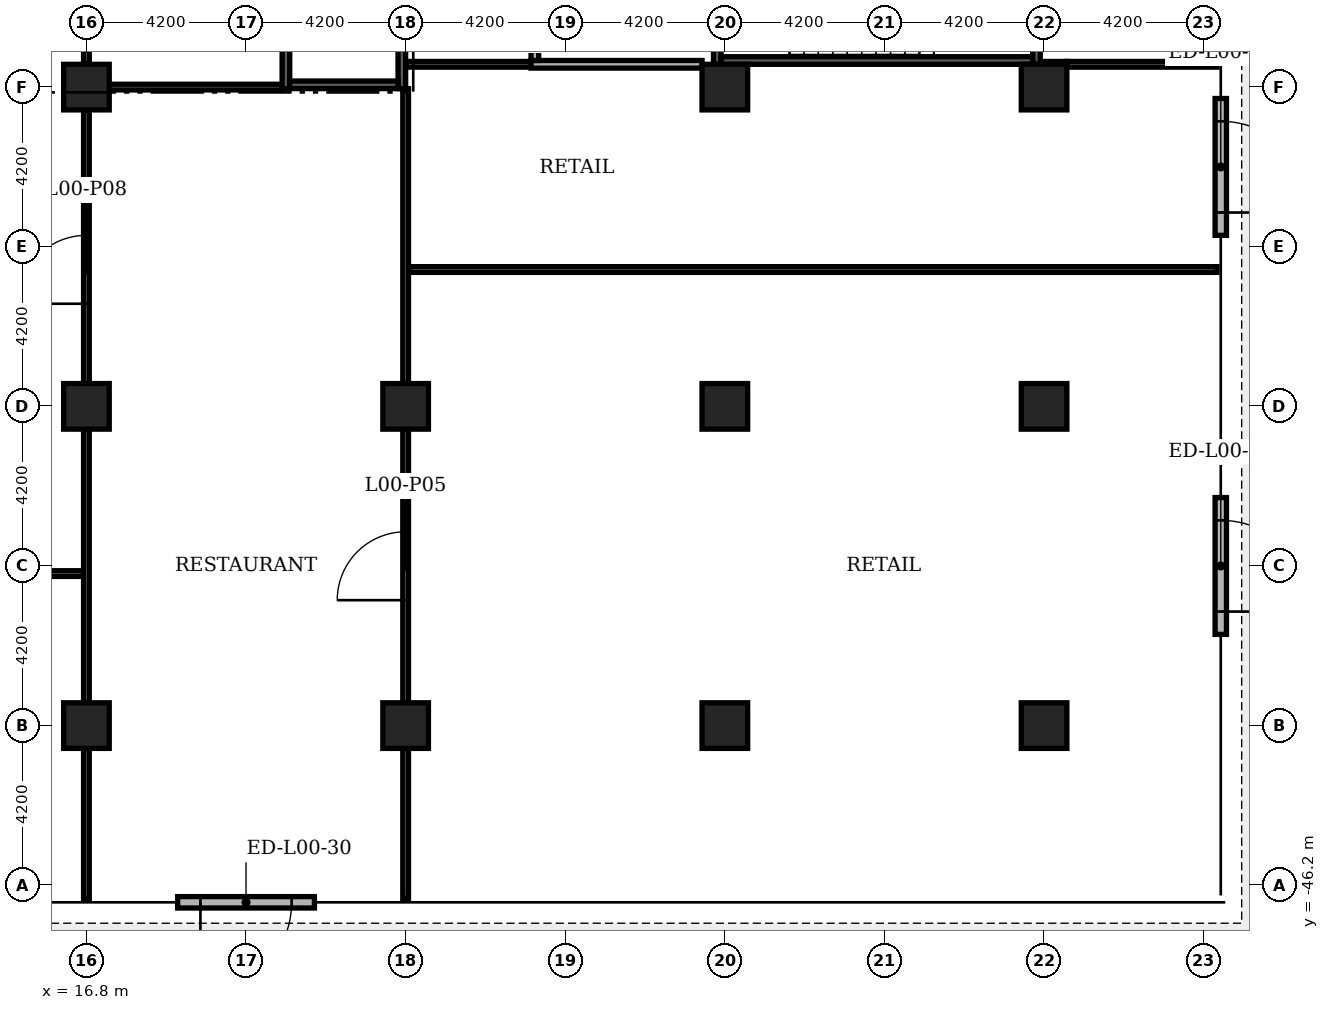
"""IFC4 building model, lengths in metres.
Left out: names, types, materials, properties, quantities, classifications, styles, units other than length and angle.
Written with IfcOpenShell. Run it as: python <this file> out.ifc"""

import sys

from ifc_helpers import new_model, si_unit, direction, frame, frame_2d, origin, origin_2d, place, context, subcontext, project, spatial, rectangle, extrude, element, fill, save


model = new_model("IFC4")
c1 = context("Model", 3, precision=1e-05, world=origin(), true_north=direction((0.0, 1.0)))
c2 = subcontext(c1, "Body", "Model", "MODEL_VIEW")
j1 = project(units=[si_unit("LENGTHUNIT", "METRE"), si_unit("PLANEANGLEUNIT", "RADIAN")], contexts=[c1])
p1 = place(None, origin())
s1 = spatial("IfcSite", under=j1, at=p1, CompositionType="ELEMENT")
p2 = place(p1, origin())
s2 = spatial("IfcBuilding", under=s1, at=p2, CompositionType="ELEMENT")
p3 = place(p2, origin())
s3 = spatial("IfcBuildingStorey", under=s2, at=p3, CompositionType="ELEMENT", Elevation=0.0)
for number, where, z_axis, x_axis in (
    (1, (16.8, -25.2, 0.0), (0.0, 0.0, 1.0), (1.0, 0.0, 0.0)),
    (2, (16.8, -33.6, 0.0), (0.0, 0.0, 1.0), (1.0, 0.0, 0.0)),
    (3, (16.8, -42.0, 0.0), (0.0, 0.0, 1.0), (1.0, 0.0, 0.0)),
    (4, (25.2, -33.6, 0.0), (0.0, 0.0, 1.0), (1.0, 0.0, 0.0)),
    (5, (25.2, -42.0, 0.0), (0.0, 0.0, 1.0), (1.0, 0.0, 0.0)),
    (6, (33.6, -25.2, 0.0), (0.0, 0.0, 1.0), (1.0, 0.0, 0.0)),
    (7, (33.6, -33.6, 0.0), (0.0, 0.0, 1.0), (1.0, 0.0, 0.0)),
    (8, (33.6, -42.0, 0.0), (0.0, 0.0, 1.0), (1.0, 0.0, 0.0)),
    (9, (42.0, -25.2, 0.0), (0.0, 0.0, 1.0), (1.0, 0.0, 0.0)),
    (10, (42.0, -33.6, 0.0), (0.0, 0.0, 1.0), (1.0, 0.0, 0.0)),
    (11, (42.0, -42.0, 0.0), (0.0, 0.0, 1.0), (1.0, 0.0, 0.0)),
):
    element("IfcColumn", number, at=place(p3, frame(where, z_axis=z_axis, x_axis=x_axis)), inside=s3, PredefinedType="COLUMN", context=c2, shape_type="SweptSolid", body=[
        extrude(rectangle(XDim=1.2, YDim=1.2, at=origin_2d()), origin(), (0.0, 0.0, 1.0), 7.2),
    ])
p4 = place(p3, frame((46.65, -39.6, 0.0), z_axis=(0.0, 0.0, 1.0), x_axis=(0.0, 1.0, 0.0)))
e12 = element("IfcWall", 12, at=p4, inside=s3, PredefinedType="STANDARD", context=c2, shape_type="SweptSolid", body=[
    extrude(rectangle(XDim=3.6, YDim=0.3, at=frame_2d((1.8, 0.0))), origin(), (0.0, 0.0, 1.0), 6.78),
])
p5 = place(p4, frame((0.6, 0.0, 0.0)))
e13 = element("IfcOpeningElement", 13, at=p5, cuts=e12, PredefinedType="OPENING", context=c2, shape_type="SweptSolid", body=[
    extrude(rectangle(XDim=2.4, YDim=2.4, at=frame_2d((1.2, 1.2))), frame((0.0, 0.16, 0.0), z_axis=(0.0, -1.0, 0.0), x_axis=(1.0, 0.0, 0.0)), (0.0, 0.0, 1.0), 0.32),
])
p6 = place(p3, frame((46.65, -29.1, 0.0), z_axis=(0.0, 0.0, 1.0), x_axis=(0.0, 1.0, 0.0)))
e14 = element("IfcWall", 14, at=p6, inside=s3, PredefinedType="STANDARD", context=c2, shape_type="SweptSolid", body=[
    extrude(rectangle(XDim=3.6, YDim=0.3, at=frame_2d((1.8, 0.0))), origin(), (0.0, 0.0, 1.0), 6.78),
])
p7 = place(p6, frame((0.6, 0.0, 0.0)))
e15 = element("IfcOpeningElement", 15, at=p7, cuts=e14, PredefinedType="OPENING", context=c2, shape_type="SweptSolid", body=[
    extrude(rectangle(XDim=2.4, YDim=2.4, at=frame_2d((1.2, 1.2))), frame((0.0, 0.16, 0.0), z_axis=(0.0, -1.0, 0.0), x_axis=(1.0, 0.0, 0.0)), (0.0, 0.0, 1.0), 0.32),
])
p8 = place(p3, frame((19.2, -46.65, 0.0), z_axis=(0.0, 0.0, 1.0), x_axis=(1.0, 0.0, 0.0)))
e16 = element("IfcWall", 16, at=p8, inside=s3, PredefinedType="STANDARD", context=c2, shape_type="SweptSolid", body=[
    extrude(rectangle(XDim=3.6, YDim=0.3, at=frame_2d((1.8, 0.0))), origin(), (0.0, 0.0, 1.0), 6.78),
])
p9 = place(p8, frame((0.6, 0.0, 0.0)))
e17 = element("IfcOpeningElement", 17, at=p9, cuts=e16, PredefinedType="OPENING", context=c2, shape_type="SweptSolid", body=[
    extrude(rectangle(XDim=2.4, YDim=2.4, at=frame_2d((1.2, 1.2))), frame((0.0, 0.16, 0.0), z_axis=(0.0, -1.0, 0.0), x_axis=(1.0, 0.0, 0.0)), (0.0, 0.0, 1.0), 0.32),
])
p10 = place(p3, frame((-16.9, -38.0, 0.0), z_axis=(0.0, 0.0, 1.0), x_axis=(1.0, 0.0, 0.0)))
e18 = element("IfcWall", 18, at=p10, inside=s3, PredefinedType="PARTITIONING", context=c2, shape_type="SweptSolid", body=[
    extrude(rectangle(XDim=33.625, YDim=0.15, at=frame_2d((16.812, 0.0))), origin(), (0.0, 0.0, 1.0), 6.38),
])
p11 = place(p10, frame((7.7, 0.0, 0.0)))
e19 = element("IfcOpeningElement", 19, at=p11, cuts=e18, PredefinedType="OPENING", context=c2, shape_type="SweptSolid", body=[
    extrude(rectangle(XDim=2.4, YDim=2.4, at=frame_2d((1.2, 1.2))), frame((0.0, 0.085, 0.0), z_axis=(0.0, -1.0, 0.0), x_axis=(1.0, 0.0, 0.0)), (0.0, 0.0, 1.0), 0.17),
])
p12 = place(p10, frame((15.7, 0.0, 0.0)))
e20 = element("IfcOpeningElement", 20, at=p12, cuts=e18, PredefinedType="OPENING", context=c2, shape_type="SweptSolid", body=[
    extrude(rectangle(XDim=2.4, YDim=2.4, at=frame_2d((1.2, 1.2))), frame((0.0, 0.085, 0.0), z_axis=(0.0, -1.0, 0.0), x_axis=(1.0, 0.0, 0.0)), (0.0, 0.0, 1.0), 0.17),
])
p13 = place(p10, frame((23.7, 0.0, 0.0)))
e21 = element("IfcOpeningElement", 21, at=p13, cuts=e18, PredefinedType="OPENING", context=c2, shape_type="SweptSolid", body=[
    extrude(rectangle(XDim=2.4, YDim=2.4, at=frame_2d((1.2, 1.2))), frame((0.0, 0.085, 0.0), z_axis=(0.0, -1.0, 0.0), x_axis=(1.0, 0.0, 0.0)), (0.0, 0.0, 1.0), 0.17),
])
p14 = place(p3, frame((25.275, -30.0, 0.0), z_axis=(0.0, 0.0, 1.0), x_axis=(1.0, 0.0, 0.0)))
e22 = element("IfcWall", 22, at=p14, inside=s3, PredefinedType="PARTITIONING", context=c2, shape_type="SweptSolid", body=[
    extrude(rectangle(XDim=21.275, YDim=0.15, at=frame_2d((10.638, 0.0))), origin(), (0.0, 0.0, 1.0), 6.38),
])
p15 = place(p3, frame((17.4, -25.2, 0.0), z_axis=(0.0, 0.0, 1.0), x_axis=(1.0, 0.0, 0.0)))
e23 = element("IfcWall", 23, at=p15, inside=s3, PredefinedType="PARTITIONING", context=c2, shape_type="SweptSolid", body=[
    extrude(rectangle(XDim=4.55, YDim=0.15, at=frame_2d((2.275, 0.0))), origin(), (0.0, 0.0, 1.0), 6.48),
])
p16 = place(p3, frame((25.2, -24.6, 0.0), z_axis=(0.0, 0.0, 1.0), x_axis=(1.0, 0.0, 0.0)))
e24 = element("IfcWall", 24, at=p16, inside=s3, PredefinedType="PARTITIONING", context=c2, shape_type="SweptSolid", body=[
    extrude(rectangle(XDim=3.5, YDim=0.15, at=frame_2d((1.75, 0.0))), origin(), (0.0, 0.0, 1.0), 6.78),
])
p17 = place(p3, frame((28.5, -24.6, 0.0), z_axis=(0.0, 0.0, 1.0), x_axis=(1.0, 0.0, 0.0)))
e25 = element("IfcWall", 25, at=p17, inside=s3, PredefinedType="PARTITIONING", context=c2, shape_type="SweptSolid", body=[
    extrude(rectangle(XDim=4.5, YDim=0.2, at=frame_2d((2.25, 0.0))), origin(), (0.0, 0.0, 1.0), 6.78),
])
p18 = place(p3, frame((41.9, -24.6, 0.0), z_axis=(0.0, 0.0, 1.0), x_axis=(1.0, 0.0, 0.0)))
e26 = element("IfcWall", 26, at=p18, inside=s3, PredefinedType="PARTITIONING", context=c2, shape_type="SweptSolid", body=[
    extrude(rectangle(XDim=0.7, YDim=0.15, at=frame_2d((0.35, 0.0))), origin(), (0.0, 0.0, 1.0), 6.78),
])
p19 = place(p3, frame((42.6, -24.6, 0.0), z_axis=(0.0, 0.0, 1.0), x_axis=(1.0, 0.0, 0.0)))
e27 = element("IfcWall", 27, at=p19, inside=s3, PredefinedType="PARTITIONING", context=c2, shape_type="SweptSolid", body=[
    extrude(rectangle(XDim=3.95, YDim=0.15, at=frame_2d((1.975, 0.0))), origin(), (0.0, 0.0, 1.0), 6.78),
])
p20 = place(p3, frame((16.8, -46.55, 0.0), z_axis=(0.0, 0.0, 1.0), x_axis=(0.0, 1.0, 0.0)))
e28 = element("IfcWall", 28, at=p20, inside=s3, PredefinedType="PARTITIONING", context=c2, shape_type="SweptSolid", body=[
    extrude(rectangle(XDim=3.95, YDim=0.15, at=frame_2d((1.975, 0.0))), origin(), (0.0, 0.0, 1.0), 6.38),
])
p21 = place(p3, frame((16.8, -41.4, 0.0), z_axis=(0.0, 0.0, 1.0), x_axis=(0.0, 1.0, 0.0)))
e29 = element("IfcWall", 29, at=p21, inside=s3, PredefinedType="PARTITIONING", context=c2, shape_type="SweptSolid", body=[
    extrude(rectangle(XDim=7.2, YDim=0.15, at=frame_2d((3.6, 0.0))), origin(), (0.0, 0.0, 1.0), 6.38),
])
p22 = place(p3, frame((16.8, -33.0, 0.0), z_axis=(0.0, 0.0, 1.0), x_axis=(0.0, 1.0, 0.0)))
e30 = element("IfcWall", 30, at=p22, inside=s3, PredefinedType="PARTITIONING", context=c2, shape_type="SweptSolid", body=[
    extrude(rectangle(XDim=7.2, YDim=0.15, at=frame_2d((3.6, 0.0))), origin(), (0.0, 0.0, 1.0), 6.38),
])
p23 = place(p22, frame((2.1, 0.0, 0.0)))
e31 = element("IfcOpeningElement", 31, at=p23, cuts=e30, PredefinedType="OPENING", context=c2, shape_type="SweptSolid", body=[
    extrude(rectangle(XDim=1.8, YDim=2.2, at=frame_2d((0.9, 1.1))), frame((0.0, 0.085, 0.0), z_axis=(0.0, -1.0, 0.0), x_axis=(1.0, 0.0, 0.0)), (0.0, 0.0, 1.0), 0.17),
])
p24 = place(p3, frame((16.8, -24.6, 0.0), z_axis=(0.0, 0.0, 1.0), x_axis=(0.0, 1.0, 0.0)))
e32 = element("IfcWall", 32, at=p24, inside=s3, PredefinedType="PARTITIONING", context=c2, shape_type="SweptSolid", body=[
    extrude(rectangle(XDim=7.5, YDim=0.15, at=frame_2d((3.75, 0.0))), origin(), (0.0, 0.0, 1.0), 6.78),
])
p25 = place(p3, frame((25.2, -46.55, 0.0), z_axis=(0.0, 0.0, 1.0), x_axis=(0.0, 1.0, 0.0)))
e33 = element("IfcWall", 33, at=p25, inside=s3, PredefinedType="PARTITIONING", context=c2, shape_type="SweptSolid", body=[
    extrude(rectangle(XDim=3.95, YDim=0.15, at=frame_2d((1.975, 0.0))), origin(), (0.0, 0.0, 1.0), 6.38),
])
p26 = place(p3, frame((25.2, -41.4, 0.0), z_axis=(0.0, 0.0, 1.0), x_axis=(0.0, 1.0, 0.0)))
e34 = element("IfcWall", 34, at=p26, inside=s3, PredefinedType="PARTITIONING", context=c2, shape_type="SweptSolid", body=[
    extrude(rectangle(XDim=7.2, YDim=0.15, at=frame_2d((3.6, 0.0))), origin(), (0.0, 0.0, 1.0), 6.38),
])
p27 = place(p26, frame((2.7, 0.0, 0.0)))
e35 = element("IfcOpeningElement", 35, at=p27, cuts=e34, PredefinedType="OPENING", context=c2, shape_type="SweptSolid", body=[
    extrude(rectangle(XDim=1.8, YDim=2.2, at=frame_2d((0.9, 1.1))), frame((0.0, 0.085, 0.0), z_axis=(0.0, -1.0, 0.0), x_axis=(1.0, 0.0, 0.0)), (0.0, 0.0, 1.0), 0.17),
])
p28 = place(p3, frame((25.2, -33.0, 0.0), z_axis=(0.0, 0.0, 1.0), x_axis=(0.0, 1.0, 0.0)))
e36 = element("IfcWall", 36, at=p28, inside=s3, PredefinedType="PARTITIONING", context=c2, shape_type="SweptSolid", body=[
    extrude(rectangle(XDim=7.76, YDim=0.15, at=frame_2d((3.88, 0.0))), origin(), (0.0, 0.0, 1.0), 6.38),
])
p29 = place(p3, frame((28.6, -24.5, 0.0), z_axis=(0.0, 0.0, 1.0), x_axis=(0.0, 1.0, 0.0)))
e37 = element("IfcWall", 37, at=p29, inside=s3, PredefinedType="PARTITIONING", context=c2, shape_type="SweptSolid", body=[
    extrude(rectangle(XDim=3.95, YDim=0.2, at=frame_2d((1.975, 0.0))), origin(), (0.0, 0.0, 1.0), 6.78),
])
p30 = place(p3, frame((22.05, -25.24, 0.0), z_axis=(0.0, 0.0, 1.0), x_axis=(0.0, 1.0, 0.0)))
e38 = element("IfcWall", 38, at=p30, inside=s3, PredefinedType="SOLIDWALL", context=c2, shape_type="SweptSolid", body=[
    extrude(rectangle(XDim=6.74, YDim=0.2, at=frame_2d((3.37, 0.0))), origin(), (0.0, 0.0, 1.0), 6.78),
])
p31 = place(p3, frame((25.1, -25.24, 0.0), z_axis=(0.0, 0.0, 1.0), x_axis=(0.0, 1.0, 0.0)))
e39 = element("IfcWall", 39, at=p31, inside=s3, PredefinedType="SOLIDWALL", context=c2, shape_type="SweptSolid", body=[
    extrude(rectangle(XDim=6.74, YDim=0.2, at=frame_2d((3.37, 0.0))), origin(), (0.0, 0.0, 1.0), 6.38),
])
p32 = place(p3, frame((22.15, -25.14, 0.0), z_axis=(0.0, 0.0, 1.0), x_axis=(1.0, 0.0, 0.0)))
e40 = element("IfcWall", 40, at=p32, inside=s3, PredefinedType="SOLIDWALL", context=c2, shape_type="SweptSolid", body=[
    extrude(rectangle(XDim=2.85, YDim=0.2, at=frame_2d((1.425, 0.0))), origin(), (0.0, 0.0, 1.0), 6.48),
])
p33 = place(p3, frame((33.4, -24.6, 0.0), z_axis=(0.0, 0.0, 1.0), x_axis=(0.0, 1.0, 0.0)))
e41 = element("IfcWall", 41, at=p33, inside=s3, PredefinedType="SOLIDWALL", context=c2, shape_type="SweptSolid", body=[
    extrude(rectangle(XDim=4.15, YDim=0.2, at=frame_2d((2.075, 0.0))), origin(), (0.0, 0.0, 1.0), 6.38),
])
p34 = place(p33, frame((1.175, 0.0, 0.0)))
e42 = element("IfcOpeningElement", 42, at=p34, cuts=e41, PredefinedType="OPENING", context=c2, shape_type="SweptSolid", body=[
    extrude(rectangle(XDim=1.8, YDim=2.2, at=frame_2d((0.9, 1.1))), frame((0.0, 0.11, 0.0), z_axis=(0.0, -1.0, 0.0), x_axis=(1.0, 0.0, 0.0)), (0.0, 0.0, 1.0), 0.22),
])
p35 = place(p3, frame((41.8, -24.6, 0.0), z_axis=(0.0, 0.0, 1.0), x_axis=(0.0, 1.0, 0.0)))
e43 = element("IfcWall", 43, at=p35, inside=s3, PredefinedType="SOLIDWALL", context=c2, shape_type="SweptSolid", body=[
    extrude(rectangle(XDim=4.15, YDim=0.2, at=frame_2d((2.075, 0.0))), origin(), (0.0, 0.0, 1.0), 6.38),
])
p36 = place(p3, frame((33.5, -24.5, 0.0), z_axis=(0.0, 0.0, 1.0), x_axis=(1.0, 0.0, 0.0)))
e44 = element("IfcWall", 44, at=p36, inside=s3, PredefinedType="SOLIDWALL", context=c2, shape_type="SweptSolid", body=[
    extrude(rectangle(XDim=8.2, YDim=0.2, at=frame_2d((4.1, 0.0))), origin(), (0.0, 0.0, 1.0), 7.0),
])
p37 = place(p5, frame((2.4, 0.0, 0.0), z_axis=(0.0, 0.0, 1.0), x_axis=(-1.0, 0.0, 0.0)))
e45 = element("IfcDoor", 45, at=p37, inside=s3, OperationType="DOUBLE_DOOR_SINGLE_SWING", PredefinedType="DOOR", context=c2, shape_type="SweptSolid", body=[
    extrude(rectangle(XDim=2.4, YDim=2.4, at=frame_2d((1.2, 1.2))), frame((0.0, 0.025, 0.0), z_axis=(0.0, -1.0, 0.0), x_axis=(1.0, 0.0, 0.0)), (0.0, 0.0, 1.0), 0.05),
])
fill(e13, e45)
p38 = place(p7, frame((2.4, 0.0, 0.0), z_axis=(0.0, 0.0, 1.0), x_axis=(-1.0, 0.0, 0.0)))
e46 = element("IfcDoor", 46, at=p38, inside=s3, OperationType="DOUBLE_DOOR_SINGLE_SWING", PredefinedType="DOOR", context=c2, shape_type="SweptSolid", body=[
    extrude(rectangle(XDim=2.4, YDim=2.4, at=frame_2d((1.2, 1.2))), frame((0.0, 0.025, 0.0), z_axis=(0.0, -1.0, 0.0), x_axis=(1.0, 0.0, 0.0)), (0.0, 0.0, 1.0), 0.05),
])
fill(e15, e46)
p39 = place(p9, frame((2.4, 0.0, 0.0), z_axis=(0.0, 0.0, 1.0), x_axis=(-1.0, 0.0, 0.0)))
e47 = element("IfcDoor", 47, at=p39, inside=s3, OperationType="DOUBLE_DOOR_SINGLE_SWING", PredefinedType="DOOR", context=c2, shape_type="SweptSolid", body=[
    extrude(rectangle(XDim=2.4, YDim=2.4, at=frame_2d((1.2, 1.2))), frame((0.0, 0.025, 0.0), z_axis=(0.0, -1.0, 0.0), x_axis=(1.0, 0.0, 0.0)), (0.0, 0.0, 1.0), 0.05),
])
fill(e17, e47)
p40 = place(p27, origin())
e48 = element("IfcDoor", 48, at=p40, inside=s3, OperationType="DOUBLE_DOOR_SINGLE_SWING", PredefinedType="DOOR", context=c2, shape_type="SweptSolid", body=[
    extrude(rectangle(XDim=1.8, YDim=2.2, at=frame_2d((0.9, 1.1))), frame((0.0, 0.025, 0.0), z_axis=(0.0, -1.0, 0.0), x_axis=(1.0, 0.0, 0.0)), (0.0, 0.0, 1.0), 0.05),
])
fill(e35, e48)
p41 = place(p23, origin())
e49 = element("IfcDoor", 49, at=p41, inside=s3, OperationType="DOUBLE_DOOR_SINGLE_SWING", PredefinedType="DOOR", context=c2, shape_type="SweptSolid", body=[
    extrude(rectangle(XDim=1.8, YDim=2.2, at=frame_2d((0.9, 1.1))), frame((0.0, 0.025, 0.0), z_axis=(0.0, -1.0, 0.0), x_axis=(1.0, 0.0, 0.0)), (0.0, 0.0, 1.0), 0.05),
])
fill(e31, e49)
save(model, sys.argv[1])
